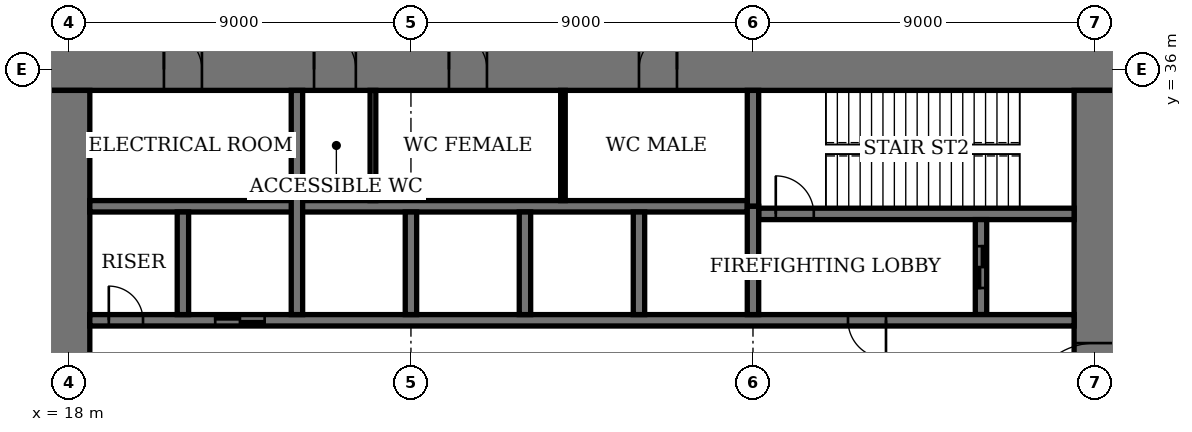
"""IFC4 building model, lengths in metres.
Left out: names, types, materials, properties, quantities, classifications, styles, units other than length and angle.
Written with IfcOpenShell. Run it as: python <this file> out.ifc"""

import sys

from ifc_helpers import new_model, si_unit, direction, frame, frame_2d, origin, place, context, subcontext, project, spatial, rectangle, extrude, element, fill, save


model = new_model("IFC4")
c1 = context("Model", 3, precision=1e-05, world=origin(), true_north=direction((0.0, 1.0)))
c2 = subcontext(c1, "Body", "Model", "MODEL_VIEW")
j1 = project(units=[si_unit("LENGTHUNIT", "METRE"), si_unit("PLANEANGLEUNIT", "RADIAN")], contexts=[c1])
p1 = place(None, origin())
s1 = spatial("IfcSite", under=j1, at=p1, CompositionType="ELEMENT")
p2 = place(p1, origin())
s2 = spatial("IfcBuilding", under=s1, at=p2, CompositionType="ELEMENT")
p3 = place(p2, frame((0.0, 0.0, 5.4)))
s3 = spatial("IfcBuildingStorey", under=s2, at=p3, CompositionType="ELEMENT", Elevation=5.4)
p4 = place(p3, frame((45.55, 36.0, 0.0), z_axis=(0.0, 0.0, 1.0), x_axis=(-1.0, 0.0, 0.0)))
e1 = element("IfcWall", 1, at=p4, inside=s3, PredefinedType="SHEAR", context=c2, shape_type="SweptSolid", body=[
    extrude(rectangle(XDim=28.1, YDim=1.1, at=frame_2d((14.05, 0.0))), origin(), (0.0, 0.0, 1.0), 5.4),
])
p5 = place(p4, frame((11.55, 0.0, 0.0)))
e2 = element("IfcOpeningElement", 2, at=p5, cuts=e1, PredefinedType="OPENING", context=c2, shape_type="SweptSolid", body=[
    extrude(rectangle(XDim=1.0, YDim=2.4, at=frame_2d((0.5, 1.2))), frame((0.0, 0.56, 0.0), z_axis=(0.0, -1.0, 0.0), x_axis=(1.0, 0.0, 0.0)), (0.0, 0.0, 1.0), 1.12),
])
p6 = place(p4, frame((16.55, 0.0, 0.0)))
e3 = element("IfcOpeningElement", 3, at=p6, cuts=e1, PredefinedType="OPENING", context=c2, shape_type="SweptSolid", body=[
    extrude(rectangle(XDim=1.0, YDim=2.4, at=frame_2d((0.5, 1.2))), frame((0.0, 0.56, 0.0), z_axis=(0.0, -1.0, 0.0), x_axis=(1.0, 0.0, 0.0)), (0.0, 0.0, 1.0), 1.12),
])
p7 = place(p4, frame((20.0, 0.0, 0.0)))
e4 = element("IfcOpeningElement", 4, at=p7, cuts=e1, PredefinedType="OPENING", context=c2, shape_type="SweptSolid", body=[
    extrude(rectangle(XDim=1.1, YDim=2.4, at=frame_2d((0.55, 1.2))), frame((0.0, 0.56, 0.0), z_axis=(0.0, -1.0, 0.0), x_axis=(1.0, 0.0, 0.0)), (0.0, 0.0, 1.0), 1.12),
])
p8 = place(p4, frame((24.05, 0.0, 0.0)))
e5 = element("IfcOpeningElement", 5, at=p8, cuts=e1, PredefinedType="OPENING", context=c2, shape_type="SweptSolid", body=[
    extrude(rectangle(XDim=1.0, YDim=2.4, at=frame_2d((0.5, 1.2))), frame((0.0, 0.56, 0.0), z_axis=(0.0, -1.0, 0.0), x_axis=(1.0, 0.0, 0.0)), (0.0, 0.0, 1.0), 1.12),
])
p9 = place(p3, frame((18.0, 35.45, 0.0), z_axis=(0.0, 0.0, 1.0), x_axis=(0.0, -1.0, 0.0)))
e6 = element("IfcWall", 6, at=p9, inside=s3, PredefinedType="SHEAR", context=c2, shape_type="SweptSolid", body=[
    extrude(rectangle(XDim=16.9, YDim=1.1, at=frame_2d((8.45, 0.0))), origin(), (0.0, 0.0, 1.0), 5.4),
])
p10 = place(p9, frame((8.45, 0.0, 0.0)))
e7 = element("IfcOpeningElement", 7, at=p10, cuts=e6, PredefinedType="OPENING", context=c2, shape_type="SweptSolid", body=[
    extrude(rectangle(XDim=1.8, YDim=2.4, at=frame_2d((0.9, 1.2))), frame((0.0, 0.56, 0.0), z_axis=(0.0, -1.0, 0.0), x_axis=(1.0, 0.0, 0.0)), (0.0, 0.0, 1.0), 1.12),
])
p11 = place(p3, frame((45.0, 18.55, 0.0), z_axis=(0.0, 0.0, 1.0), x_axis=(0.0, 1.0, 0.0)))
e8 = element("IfcWall", 8, at=p11, inside=s3, PredefinedType="SHEAR", context=c2, shape_type="SweptSolid", body=[
    extrude(rectangle(XDim=16.9, YDim=1.1, at=frame_2d((8.45, 0.0))), origin(), (0.0, 0.0, 1.0), 5.4),
])
p12 = place(p11, frame((8.45, 0.0, 0.0)))
e9 = element("IfcOpeningElement", 9, at=p12, cuts=e8, PredefinedType="OPENING", context=c2, shape_type="SweptSolid", body=[
    extrude(rectangle(XDim=1.8, YDim=2.4, at=frame_2d((0.9, 1.2))), frame((0.0, 0.56, 0.0), z_axis=(0.0, -1.0, 0.0), x_axis=(1.0, 0.0, 0.0)), (0.0, 0.0, 1.0), 1.12),
])
p13 = place(p3, frame((36.15, 32.2, 0.0), z_axis=(0.0, 0.0, 1.0), x_axis=(1.0, 0.0, 0.0)))
e10 = element("IfcWall", 10, at=p13, inside=s3, PredefinedType="SHEAR", context=c2, shape_type="SweptSolid", body=[
    extrude(rectangle(XDim=8.3, YDim=0.3, at=frame_2d((4.15, 0.0))), origin(), (0.0, 0.0, 1.0), 5.4),
])
p14 = place(p13, frame((0.45, 0.0, 0.0)))
e11 = element("IfcOpeningElement", 11, at=p14, cuts=e10, PredefinedType="OPENING", context=c2, shape_type="SweptSolid", body=[
    extrude(rectangle(XDim=1.0, YDim=2.4, at=frame_2d((0.5, 1.2))), frame((0.0, 0.16, 0.0), z_axis=(0.0, -1.0, 0.0), x_axis=(1.0, 0.0, 0.0)), (0.0, 0.0, 1.0), 0.32),
])
p15 = place(p3, frame((36.0, 32.4, 0.0), z_axis=(0.0, 0.0, 1.0), x_axis=(0.0, 1.0, 0.0)))
e12 = element("IfcWall", 12, at=p15, inside=s3, PredefinedType="SHEAR", context=c2, shape_type="SweptSolid", body=[
    extrude(rectangle(XDim=3.05, YDim=0.3, at=frame_2d((1.525, 0.0))), origin(), (0.0, 0.0, 1.0), 5.4),
])
p16 = place(p3, frame((42.0, 29.55, 0.0), z_axis=(0.0, 0.0, 1.0), x_axis=(0.0, 1.0, 0.0)))
e13 = element("IfcWall", 13, at=p16, inside=s3, PredefinedType="SHEAR", context=c2, shape_type="SweptSolid", body=[
    extrude(rectangle(XDim=2.5, YDim=0.3, at=frame_2d((1.25, 0.0))), origin(), (0.0, 0.0, 1.0), 5.4),
])
p17 = place(p16, frame((0.7, 0.0, 0.0)))
e14 = element("IfcOpeningElement", 14, at=p17, cuts=e13, PredefinedType="OPENING", context=c2, shape_type="SweptSolid", body=[
    extrude(rectangle(XDim=1.1, YDim=2.4, at=frame_2d((0.55, 1.2))), frame((0.0, 0.16, 0.0), z_axis=(0.0, -1.0, 0.0), x_axis=(1.0, 0.0, 0.0)), (0.0, 0.0, 1.0), 0.32),
])
p18 = place(p3, frame((18.55, 29.4, 0.0), z_axis=(0.0, 0.0, 1.0), x_axis=(1.0, 0.0, 0.0)))
e15 = element("IfcWall", 15, at=p18, inside=s3, PredefinedType="SHEAR", context=c2, shape_type="SweptSolid", body=[
    extrude(rectangle(XDim=25.9, YDim=0.3, at=frame_2d((12.95, 0.0))), origin(), (0.0, 0.0, 1.0), 5.4),
])
p19 = place(p18, frame((19.95, 0.0, 0.0)))
e16 = element("IfcOpeningElement", 16, at=p19, cuts=e15, PredefinedType="OPENING", context=c2, shape_type="SweptSolid", body=[
    extrude(rectangle(XDim=1.0, YDim=2.4, at=frame_2d((0.5, 1.2))), frame((0.0, 0.16, 0.0), z_axis=(0.0, -1.0, 0.0), x_axis=(1.0, 0.0, 0.0)), (0.0, 0.0, 1.0), 0.32),
])
p20 = place(p18, frame((0.5, 0.0, 0.0)))
e17 = element("IfcOpeningElement", 17, at=p20, cuts=e15, PredefinedType="OPENING", context=c2, shape_type="SweptSolid", body=[
    extrude(rectangle(XDim=0.9, YDim=2.1, at=frame_2d((0.45, 1.05))), frame((0.0, 0.16, 0.0), z_axis=(0.0, -1.0, 0.0), x_axis=(1.0, 0.0, 0.0)), (0.0, 0.0, 1.0), 0.32),
])
p21 = place(p18, frame((3.3, 0.0, 0.0)))
e18 = element("IfcOpeningElement", 18, at=p21, cuts=e15, PredefinedType="OPENING", context=c2, shape_type="SweptSolid", body=[
    extrude(rectangle(XDim=1.3, YDim=2.4, at=frame_2d((0.65, 1.2))), frame((0.0, 0.16, 0.0), z_axis=(0.0, -1.0, 0.0), x_axis=(1.0, 0.0, 0.0)), (0.0, 0.0, 1.0), 0.32),
])
p22 = place(p3, frame((18.55, 32.4, 0.0), z_axis=(0.0, 0.0, 1.0), x_axis=(1.0, 0.0, 0.0)))
e19 = element("IfcWall", 19, at=p22, inside=s3, PredefinedType="SHEAR", context=c2, shape_type="SweptSolid", body=[
    extrude(rectangle(XDim=17.3, YDim=0.3, at=frame_2d((8.65, 0.0))), origin(), (0.0, 0.0, 1.0), 5.4),
])
for number, where, z_axis, x_axis in (
    (20, (33.0, 29.55, 0.0), (0.0, 0.0, 1.0), (0.0, 1.0, 0.0)),
    (21, (30.0, 29.55, 0.0), (0.0, 0.0, 1.0), (0.0, 1.0, 0.0)),
    (22, (27.0, 29.55, 0.0), (0.0, 0.0, 1.0), (0.0, 1.0, 0.0)),
):
    element("IfcWall", number, at=place(p3, frame(where, z_axis=z_axis, x_axis=x_axis)), inside=s3, PredefinedType="SHEAR", context=c2, shape_type="SweptSolid", body=[
        extrude(rectangle(XDim=2.7, YDim=0.3, at=frame_2d((1.35, 0.0))), origin(), (0.0, 0.0, 1.0), 5.4),
    ])
p23 = place(p3, frame((24.0, 29.55, 0.0), z_axis=(0.0, 0.0, 1.0), x_axis=(0.0, 1.0, 0.0)))
e23 = element("IfcWall", 23, at=p23, inside=s3, PredefinedType="SHEAR", context=c2, shape_type="SweptSolid", body=[
    extrude(rectangle(XDim=5.9, YDim=0.3, at=frame_2d((2.95, 0.0))), origin(), (0.0, 0.0, 1.0), 5.4),
])
p24 = place(p3, frame((21.0, 29.55, 0.0), z_axis=(0.0, 0.0, 1.0), x_axis=(0.0, 1.0, 0.0)))
e24 = element("IfcWall", 24, at=p24, inside=s3, PredefinedType="SHEAR", context=c2, shape_type="SweptSolid", body=[
    extrude(rectangle(XDim=2.7, YDim=0.3, at=frame_2d((1.35, 0.0))), origin(), (0.0, 0.0, 1.0), 5.4),
])
p25 = place(p3, frame((36.0, 29.55, 0.0), z_axis=(0.0, 0.0, 1.0), x_axis=(0.0, 1.0, 0.0)))
e25 = element("IfcWall", 25, at=p25, inside=s3, PredefinedType="SHEAR", context=c2, shape_type="SweptSolid", body=[
    extrude(rectangle(XDim=2.85, YDim=0.3, at=frame_2d((1.425, 0.0))), origin(), (0.0, 0.0, 1.0), 5.4),
])
p26 = place(p3, frame((31.0, 32.55, 0.0), z_axis=(0.0, 0.0, 1.0), x_axis=(0.0, 1.0, 0.0)))
e26 = element("IfcWall", 26, at=p26, inside=s3, PredefinedType="PARTITIONING", context=c2, shape_type="SweptSolid", body=[
    extrude(rectangle(XDim=2.9, YDim=0.12, at=frame_2d((1.45, 0.0))), origin(), (0.0, 0.0, 1.0), 5.1),
])
p27 = place(p3, frame((26.0, 32.55, 0.0), z_axis=(0.0, 0.0, 1.0), x_axis=(0.0, 1.0, 0.0)))
e27 = element("IfcWall", 27, at=p27, inside=s3, PredefinedType="PARTITIONING", context=c2, shape_type="SweptSolid", body=[
    extrude(rectangle(XDim=2.9, YDim=0.15, at=frame_2d((1.45, 0.0))), origin(), (0.0, 0.0, 1.0), 5.1),
])
p28 = place(p12, origin())
e28 = element("IfcDoor", 28, at=p28, inside=s3, OperationType="DOUBLE_DOOR_DOUBLE_SWING", PredefinedType="DOOR", context=c2, shape_type="SweptSolid", body=[
    extrude(rectangle(XDim=1.8, YDim=2.4, at=frame_2d((0.9, 1.2))), frame((0.0, 0.03, 0.0), z_axis=(0.0, -1.0, 0.0), x_axis=(1.0, 0.0, 0.0)), (0.0, 0.0, 1.0), 0.06),
    extrude(rectangle(XDim=0.04, YDim=2.4, at=frame_2d((0.02, 1.2))), frame((0.0, 0.55, 0.0), z_axis=(0.0, -1.0, 0.0), x_axis=(1.0, 0.0, 0.0)), (0.0, 0.0, 1.0), 1.1),
    extrude(rectangle(XDim=0.04, YDim=2.4, at=frame_2d((1.78, 1.2))), frame((0.0, 0.55, 0.0), z_axis=(0.0, -1.0, 0.0), x_axis=(1.0, 0.0, 0.0)), (0.0, 0.0, 1.0), 1.1),
    extrude(rectangle(XDim=1.8, YDim=0.04, at=frame_2d((0.9, 2.38))), frame((0.0, 0.55, 0.0), z_axis=(0.0, -1.0, 0.0), x_axis=(1.0, 0.0, 0.0)), (0.0, 0.0, 1.0), 1.1),
])
fill(e9, e28)
p29 = place(p5, origin())
e29 = element("IfcDoor", 29, at=p29, inside=s3, OperationType="SINGLE_SWING_LEFT", PredefinedType="DOOR", context=c2, shape_type="SweptSolid", body=[
    extrude(rectangle(XDim=1.0, YDim=2.4, at=frame_2d((0.5, 1.2))), frame((0.0, 0.025, 0.0), z_axis=(0.0, -1.0, 0.0), x_axis=(1.0, 0.0, 0.0)), (0.0, 0.0, 1.0), 0.05),
    extrude(rectangle(XDim=0.04, YDim=2.4, at=frame_2d((0.02, 1.2))), frame((0.0, 0.4, 0.0), z_axis=(0.0, -1.0, 0.0), x_axis=(1.0, 0.0, 0.0)), (0.0, 0.0, 1.0), 0.8),
    extrude(rectangle(XDim=0.04, YDim=2.4, at=frame_2d((0.98, 1.2))), frame((0.0, 0.4, 0.0), z_axis=(0.0, -1.0, 0.0), x_axis=(1.0, 0.0, 0.0)), (0.0, 0.0, 1.0), 0.8),
    extrude(rectangle(XDim=1.0, YDim=0.04, at=frame_2d((0.5, 2.38))), frame((0.0, 0.4, 0.0), z_axis=(0.0, -1.0, 0.0), x_axis=(1.0, 0.0, 0.0)), (0.0, 0.0, 1.0), 0.8),
])
fill(e2, e29)
p30 = place(p6, origin())
e30 = element("IfcDoor", 30, at=p30, inside=s3, OperationType="SINGLE_SWING_RIGHT", PredefinedType="DOOR", context=c2, shape_type="SweptSolid", body=[
    extrude(rectangle(XDim=1.0, YDim=2.4, at=frame_2d((0.5, 1.2))), frame((0.0, 0.025, 0.0), z_axis=(0.0, -1.0, 0.0), x_axis=(1.0, 0.0, 0.0)), (0.0, 0.0, 1.0), 0.05),
    extrude(rectangle(XDim=0.04, YDim=2.4, at=frame_2d((0.02, 1.2))), frame((0.0, 0.4, 0.0), z_axis=(0.0, -1.0, 0.0), x_axis=(1.0, 0.0, 0.0)), (0.0, 0.0, 1.0), 0.8),
    extrude(rectangle(XDim=0.04, YDim=2.4, at=frame_2d((0.98, 1.2))), frame((0.0, 0.4, 0.0), z_axis=(0.0, -1.0, 0.0), x_axis=(1.0, 0.0, 0.0)), (0.0, 0.0, 1.0), 0.8),
    extrude(rectangle(XDim=1.0, YDim=0.04, at=frame_2d((0.5, 2.38))), frame((0.0, 0.4, 0.0), z_axis=(0.0, -1.0, 0.0), x_axis=(1.0, 0.0, 0.0)), (0.0, 0.0, 1.0), 0.8),
])
fill(e3, e30)
p31 = place(p7, origin())
e31 = element("IfcDoor", 31, at=p31, inside=s3, OperationType="SINGLE_SWING_RIGHT", PredefinedType="DOOR", context=c2, shape_type="SweptSolid", body=[
    extrude(rectangle(XDim=1.1, YDim=2.4, at=frame_2d((0.55, 1.2))), frame((0.0, 0.025, 0.0), z_axis=(0.0, -1.0, 0.0), x_axis=(1.0, 0.0, 0.0)), (0.0, 0.0, 1.0), 0.05),
    extrude(rectangle(XDim=0.04, YDim=2.4, at=frame_2d((0.02, 1.2))), frame((0.0, 0.44, 0.0), z_axis=(0.0, -1.0, 0.0), x_axis=(1.0, 0.0, 0.0)), (0.0, 0.0, 1.0), 0.88),
    extrude(rectangle(XDim=0.04, YDim=2.4, at=frame_2d((1.08, 1.2))), frame((0.0, 0.44, 0.0), z_axis=(0.0, -1.0, 0.0), x_axis=(1.0, 0.0, 0.0)), (0.0, 0.0, 1.0), 0.88),
    extrude(rectangle(XDim=1.1, YDim=0.04, at=frame_2d((0.55, 2.38))), frame((0.0, 0.44, 0.0), z_axis=(0.0, -1.0, 0.0), x_axis=(1.0, 0.0, 0.0)), (0.0, 0.0, 1.0), 0.88),
])
fill(e4, e31)
p32 = place(p8, origin())
e32 = element("IfcDoor", 32, at=p32, inside=s3, OperationType="SINGLE_SWING_RIGHT", PredefinedType="DOOR", context=c2, shape_type="SweptSolid", body=[
    extrude(rectangle(XDim=1.0, YDim=2.4, at=frame_2d((0.5, 1.2))), frame((0.0, 0.025, 0.0), z_axis=(0.0, -1.0, 0.0), x_axis=(1.0, 0.0, 0.0)), (0.0, 0.0, 1.0), 0.05),
    extrude(rectangle(XDim=0.04, YDim=2.4, at=frame_2d((0.02, 1.2))), frame((0.0, 0.4, 0.0), z_axis=(0.0, -1.0, 0.0), x_axis=(1.0, 0.0, 0.0)), (0.0, 0.0, 1.0), 0.8),
    extrude(rectangle(XDim=0.04, YDim=2.4, at=frame_2d((0.98, 1.2))), frame((0.0, 0.4, 0.0), z_axis=(0.0, -1.0, 0.0), x_axis=(1.0, 0.0, 0.0)), (0.0, 0.0, 1.0), 0.8),
    extrude(rectangle(XDim=1.0, YDim=0.04, at=frame_2d((0.5, 2.38))), frame((0.0, 0.4, 0.0), z_axis=(0.0, -1.0, 0.0), x_axis=(1.0, 0.0, 0.0)), (0.0, 0.0, 1.0), 0.8),
])
fill(e5, e32)
p33 = place(p14, origin())
e33 = element("IfcDoor", 33, at=p33, inside=s3, OperationType="SINGLE_SWING_RIGHT", PredefinedType="DOOR", context=c2, shape_type="SweptSolid", body=[
    extrude(rectangle(XDim=1.0, YDim=2.4, at=frame_2d((0.5, 1.2))), frame((0.0, 0.03, 0.0), z_axis=(0.0, -1.0, 0.0), x_axis=(1.0, 0.0, 0.0)), (0.0, 0.0, 1.0), 0.06),
])
fill(e11, e33)
p34 = place(p19, origin())
e34 = element("IfcDoor", 34, at=p34, inside=s3, OperationType="SINGLE_SWING_RIGHT", PredefinedType="DOOR", context=c2, shape_type="SweptSolid", body=[
    extrude(rectangle(XDim=1.0, YDim=2.4, at=frame_2d((0.5, 1.2))), frame((0.0, 0.03, 0.0), z_axis=(0.0, -1.0, 0.0), x_axis=(1.0, 0.0, 0.0)), (0.0, 0.0, 1.0), 0.06),
])
fill(e16, e34)
p35 = place(p20, origin())
e35 = element("IfcDoor", 35, at=p35, inside=s3, OperationType="SINGLE_SWING_RIGHT", PredefinedType="DOOR", context=c2, shape_type="SweptSolid", body=[
    extrude(rectangle(XDim=0.9, YDim=2.1, at=frame_2d((0.45, 1.05))), frame((0.0, 0.03, 0.0), z_axis=(0.0, -1.0, 0.0), x_axis=(1.0, 0.0, 0.0)), (0.0, 0.0, 1.0), 0.06),
])
fill(e17, e35)
p36 = place(p21, origin())
e36 = element("IfcDoor", 36, at=p36, inside=s3, OperationType="DOUBLE_DOOR_SLIDING", PredefinedType="DOOR", context=c2, shape_type="SweptSolid", body=[
    extrude(rectangle(XDim=1.3, YDim=2.4, at=frame_2d((0.65, 1.2))), frame((0.0, 0.02, 0.0), z_axis=(0.0, -1.0, 0.0), x_axis=(1.0, 0.0, 0.0)), (0.0, 0.0, 1.0), 0.04),
])
fill(e18, e36)
p37 = place(p17, origin())
e37 = element("IfcDoor", 37, at=p37, inside=s3, OperationType="DOUBLE_DOOR_SLIDING", PredefinedType="DOOR", context=c2, shape_type="SweptSolid", body=[
    extrude(rectangle(XDim=1.1, YDim=2.4, at=frame_2d((0.55, 1.2))), frame((0.0, 0.03, 0.0), z_axis=(0.0, -1.0, 0.0), x_axis=(1.0, 0.0, 0.0)), (0.0, 0.0, 1.0), 0.06),
])
fill(e14, e37)
save(model, sys.argv[1])
